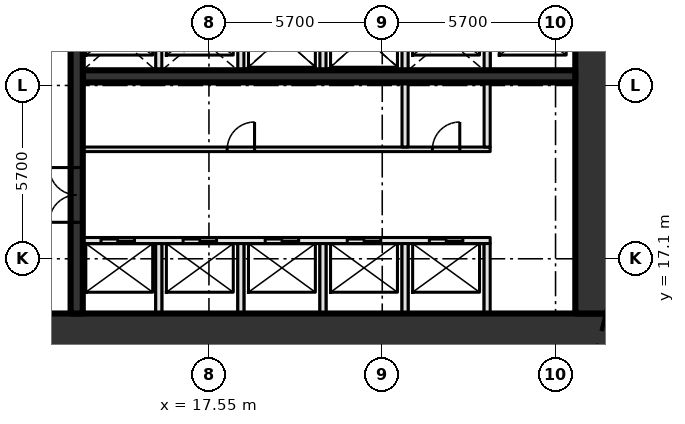
"""IFC4 building model, lengths in metres.
Left out: names, types, materials, properties, quantities, classifications, styles, units other than length and angle.
Written with IfcOpenShell. Run it as: python <this file> out.ifc"""

import sys

from ifc_helpers import new_model, si_unit, direction, frame, frame_2d, origin, place, context, subcontext, project, spatial, rectangle, extrude, element, fill, save


model = new_model("IFC4")
c1 = context("Model", 3, precision=1e-05, world=origin(), true_north=direction((0.0, 1.0)))
c2 = subcontext(c1, "Body", "Model", "MODEL_VIEW")
j1 = project(units=[si_unit("LENGTHUNIT", "METRE"), si_unit("PLANEANGLEUNIT", "RADIAN")], contexts=[c1])
p1 = place(None, origin())
s1 = spatial("IfcSite", under=j1, at=p1, CompositionType="ELEMENT")
p2 = place(p1, origin())
s2 = spatial("IfcBuilding", under=s1, at=p2, CompositionType="ELEMENT")
p3 = place(p2, origin())
s3 = spatial("IfcBuildingStorey", under=s2, at=p3, CompositionType="ELEMENT", Elevation=0.0)
p4 = place(p3, frame((8.0, 14.7, -0.45), z_axis=(0.0, 0.0, 1.0), x_axis=(1.0, 0.0, 0.0)))
e1 = element("IfcWall", 1, at=p4, inside=s3, PredefinedType="SHEAR", context=c2, shape_type="SweptSolid", body=[
    extrude(rectangle(XDim=22.8, YDim=1.2, at=frame_2d((11.4, 0.0))), origin(), (0.0, 0.0, 1.0), 7.2),
])
p5 = place(p4, frame((2.3, 0.0, 0.45)))
e2 = element("IfcOpeningElement", 2, at=p5, cuts=e1, PredefinedType="OPENING", context=c2, shape_type="SweptSolid", body=[
    extrude(rectangle(XDim=1.8, YDim=2.1, at=frame_2d((0.9, 1.05))), frame((0.0, 0.61, 0.0), z_axis=(0.0, -1.0, 0.0), x_axis=(1.0, 0.0, 0.0)), (0.0, 0.0, 1.0), 1.22),
])
p6 = place(p3, frame((30.2, 15.3, -0.45), z_axis=(0.0, 0.0, 1.0), x_axis=(0.0, 1.0, 0.0)))
e3 = element("IfcWall", 3, at=p6, inside=s3, PredefinedType="SHEAR", context=c2, shape_type="SweptSolid", body=[
    extrude(rectangle(XDim=20.4, YDim=1.2, at=frame_2d((10.2, 0.0))), origin(), (0.0, 0.0, 1.0), 7.2),
])
p7 = place(p3, frame((13.4, 17.7, 0.0), z_axis=(0.0, 0.0, 1.0), x_axis=(1.0, 0.0, 0.0)))
e4 = element("IfcWall", 4, at=p7, inside=s3, PredefinedType="SOLIDWALL", context=c2, shape_type="SweptSolid", body=[
    extrude(rectangle(XDim=13.4, YDim=0.2, at=frame_2d((6.7, 0.0))), origin(), (0.0, 0.0, 1.0), 6.75),
])
p8 = place(p7, frame((0.6, 0.0, 0.0)))
e5 = element("IfcOpeningElement", 5, at=p8, cuts=e4, PredefinedType="OPENING", context=c2, shape_type="SweptSolid", body=[
    extrude(rectangle(XDim=1.1, YDim=2.1, at=frame_2d((0.55, 1.05))), frame((0.0, 0.11, 0.0), z_axis=(0.0, -1.0, 0.0), x_axis=(1.0, 0.0, 0.0)), (0.0, 0.0, 1.0), 0.22),
])
p9 = place(p7, frame((3.3, 0.0, 0.0)))
e6 = element("IfcOpeningElement", 6, at=p9, cuts=e4, PredefinedType="OPENING", context=c2, shape_type="SweptSolid", body=[
    extrude(rectangle(XDim=1.1, YDim=2.1, at=frame_2d((0.55, 1.05))), frame((0.0, 0.11, 0.0), z_axis=(0.0, -1.0, 0.0), x_axis=(1.0, 0.0, 0.0)), (0.0, 0.0, 1.0), 0.22),
])
p10 = place(p7, frame((6.0, 0.0, 0.0)))
e7 = element("IfcOpeningElement", 7, at=p10, cuts=e4, PredefinedType="OPENING", context=c2, shape_type="SweptSolid", body=[
    extrude(rectangle(XDim=1.1, YDim=2.1, at=frame_2d((0.55, 1.05))), frame((0.0, 0.11, 0.0), z_axis=(0.0, -1.0, 0.0), x_axis=(1.0, 0.0, 0.0)), (0.0, 0.0, 1.0), 0.22),
])
p11 = place(p7, frame((8.7, 0.0, 0.0)))
e8 = element("IfcOpeningElement", 8, at=p11, cuts=e4, PredefinedType="OPENING", context=c2, shape_type="SweptSolid", body=[
    extrude(rectangle(XDim=1.1, YDim=2.1, at=frame_2d((0.55, 1.05))), frame((0.0, 0.11, 0.0), z_axis=(0.0, -1.0, 0.0), x_axis=(1.0, 0.0, 0.0)), (0.0, 0.0, 1.0), 0.22),
])
p12 = place(p7, frame((11.4, 0.0, 0.0)))
e9 = element("IfcOpeningElement", 9, at=p12, cuts=e4, PredefinedType="OPENING", context=c2, shape_type="SweptSolid", body=[
    extrude(rectangle(XDim=1.1, YDim=2.1, at=frame_2d((0.55, 1.05))), frame((0.0, 0.11, 0.0), z_axis=(0.0, -1.0, 0.0), x_axis=(1.0, 0.0, 0.0)), (0.0, 0.0, 1.0), 0.22),
])
p13 = place(p3, frame((13.4, 20.7, 0.0), z_axis=(0.0, 0.0, 1.0), x_axis=(1.0, 0.0, 0.0)))
e10 = element("IfcWall", 10, at=p13, inside=s3, PredefinedType="PARTITIONING", context=c2, shape_type="SweptSolid", body=[
    extrude(rectangle(XDim=13.4, YDim=0.15, at=frame_2d((6.7, 0.0))), origin(), (0.0, 0.0, 1.0), 6.75),
])
p14 = place(p13, frame((4.75, 0.0, 0.0)))
e11 = element("IfcOpeningElement", 11, at=p14, cuts=e10, PredefinedType="OPENING", context=c2, shape_type="SweptSolid", body=[
    extrude(rectangle(XDim=0.9, YDim=2.1, at=frame_2d((0.45, 1.05))), frame((0.0, 0.085, 0.0), z_axis=(0.0, -1.0, 0.0), x_axis=(1.0, 0.0, 0.0)), (0.0, 0.0, 1.0), 0.17),
])
p15 = place(p13, frame((11.5, 0.0, 0.0)))
e12 = element("IfcOpeningElement", 12, at=p15, cuts=e10, PredefinedType="OPENING", context=c2, shape_type="SweptSolid", body=[
    extrude(rectangle(XDim=0.9, YDim=2.1, at=frame_2d((0.45, 1.05))), frame((0.0, 0.085, 0.0), z_axis=(0.0, -1.0, 0.0), x_axis=(1.0, 0.0, 0.0)), (0.0, 0.0, 1.0), 0.17),
])
p16 = place(p3, frame((13.4, 23.1, 0.0), z_axis=(0.0, 0.0, 1.0), x_axis=(1.0, 0.0, 0.0)))
e13 = element("IfcWall", 13, at=p16, inside=s3, PredefinedType="SHEAR", context=c2, shape_type="SweptSolid", body=[
    extrude(rectangle(XDim=16.2, YDim=0.4, at=frame_2d((8.1, 0.0))), origin(), (0.0, 0.0, 1.0), 6.75),
])
p17 = place(p3, frame((13.2, 15.3, 0.0), z_axis=(0.0, 0.0, 1.0), x_axis=(0.0, 1.0, 0.0)))
e14 = element("IfcWall", 14, at=p17, inside=s3, PredefinedType="SHEAR", context=c2, shape_type="SweptSolid", body=[
    extrude(rectangle(XDim=20.4, YDim=0.4, at=frame_2d((10.2, 0.0))), origin(), (0.0, 0.0, 1.0), 6.75),
])
p18 = place(p17, frame((3.0, 0.0, 0.0)))
e15 = element("IfcOpeningElement", 15, at=p18, cuts=e14, PredefinedType="OPENING", context=c2, shape_type="SweptSolid", body=[
    extrude(rectangle(XDim=1.8, YDim=2.1, at=frame_2d((0.9, 1.05))), frame((0.0, 0.21, 0.0), z_axis=(0.0, -1.0, 0.0), x_axis=(1.0, 0.0, 0.0)), (0.0, 0.0, 1.0), 0.42),
])
p19 = place(p17, frame((11.1, 0.0, 0.0)))
e16 = element("IfcOpeningElement", 16, at=p19, cuts=e14, PredefinedType="OPENING", context=c2, shape_type="SweptSolid", body=[
    extrude(rectangle(XDim=1.2, YDim=2.1, at=frame_2d((0.6, 1.05))), frame((0.0, 0.21, 0.0), z_axis=(0.0, -1.0, 0.0), x_axis=(1.0, 0.0, 0.0)), (0.0, 0.0, 1.0), 0.42),
])
p20 = place(p3, frame((15.9, 15.3, 0.0), z_axis=(0.0, 0.0, 1.0), x_axis=(0.0, 1.0, 0.0)))
e17 = element("IfcWall", 17, at=p20, inside=s3, PredefinedType="SOLIDWALL", context=c2, shape_type="SweptSolid", body=[
    extrude(rectangle(XDim=2.3, YDim=0.2, at=frame_2d((1.15, 0.0))), origin(), (0.0, 0.0, 1.0), 6.75),
])
p21 = place(p3, frame((15.9, 23.3, 0.0), z_axis=(0.0, 0.0, 1.0), x_axis=(0.0, 1.0, 0.0)))
e18 = element("IfcWall", 18, at=p21, inside=s3, PredefinedType="SOLIDWALL", context=c2, shape_type="SweptSolid", body=[
    extrude(rectangle(XDim=2.1, YDim=0.2, at=frame_2d((1.05, 0.0))), origin(), (0.0, 0.0, 1.0), 6.75),
])
p22 = place(p3, frame((18.6, 15.3, 0.0), z_axis=(0.0, 0.0, 1.0), x_axis=(0.0, 1.0, 0.0)))
e19 = element("IfcWall", 19, at=p22, inside=s3, PredefinedType="SOLIDWALL", context=c2, shape_type="SweptSolid", body=[
    extrude(rectangle(XDim=2.3, YDim=0.2, at=frame_2d((1.15, 0.0))), origin(), (0.0, 0.0, 1.0), 6.75),
])
p23 = place(p3, frame((18.6, 23.3, 0.0), z_axis=(0.0, 0.0, 1.0), x_axis=(0.0, 1.0, 0.0)))
e20 = element("IfcWall", 20, at=p23, inside=s3, PredefinedType="SOLIDWALL", context=c2, shape_type="SweptSolid", body=[
    extrude(rectangle(XDim=5.1, YDim=0.2, at=frame_2d((2.55, 0.0))), origin(), (0.0, 0.0, 1.0), 6.75),
])
p24 = place(p23, frame((3.1, 0.0, 0.0)))
e21 = element("IfcOpeningElement", 21, at=p24, cuts=e20, PredefinedType="OPENING", context=c2, shape_type="SweptSolid", body=[
    extrude(rectangle(XDim=1.2, YDim=2.1, at=frame_2d((0.6, 1.05))), frame((0.0, 0.11, 0.0), z_axis=(0.0, -1.0, 0.0), x_axis=(1.0, 0.0, 0.0)), (0.0, 0.0, 1.0), 0.22),
])
p25 = place(p3, frame((21.3, 15.3, 0.0), z_axis=(0.0, 0.0, 1.0), x_axis=(0.0, 1.0, 0.0)))
e22 = element("IfcWall", 22, at=p25, inside=s3, PredefinedType="SOLIDWALL", context=c2, shape_type="SweptSolid", body=[
    extrude(rectangle(XDim=2.3, YDim=0.2, at=frame_2d((1.15, 0.0))), origin(), (0.0, 0.0, 1.0), 6.75),
])
p26 = place(p3, frame((21.3, 23.3, 0.0), z_axis=(0.0, 0.0, 1.0), x_axis=(0.0, 1.0, 0.0)))
e23 = element("IfcWall", 23, at=p26, inside=s3, PredefinedType="SOLIDWALL", context=c2, shape_type="SweptSolid", body=[
    extrude(rectangle(XDim=2.1, YDim=0.2, at=frame_2d((1.05, 0.0))), origin(), (0.0, 0.0, 1.0), 6.75),
])
p27 = place(p3, frame((24.0, 15.3, 0.0), z_axis=(0.0, 0.0, 1.0), x_axis=(0.0, 1.0, 0.0)))
e24 = element("IfcWall", 24, at=p27, inside=s3, PredefinedType="SOLIDWALL", context=c2, shape_type="SweptSolid", body=[
    extrude(rectangle(XDim=2.3, YDim=0.2, at=frame_2d((1.15, 0.0))), origin(), (0.0, 0.0, 1.0), 6.75),
])
p28 = place(p3, frame((24.0, 20.775, 0.0), z_axis=(0.0, 0.0, 1.0), x_axis=(0.0, 1.0, 0.0)))
e25 = element("IfcWall", 25, at=p28, inside=s3, PredefinedType="SOLIDWALL", context=c2, shape_type="SweptSolid", body=[
    extrude(rectangle(XDim=4.625, YDim=0.2, at=frame_2d((2.312, 0.0))), origin(), (0.0, 0.0, 1.0), 6.75),
])
p29 = place(p3, frame((26.7, 15.3, 0.0), z_axis=(0.0, 0.0, 1.0), x_axis=(0.0, 1.0, 0.0)))
e26 = element("IfcWall", 26, at=p29, inside=s3, PredefinedType="SOLIDWALL", context=c2, shape_type="SweptSolid", body=[
    extrude(rectangle(XDim=2.3, YDim=0.2, at=frame_2d((1.15, 0.0))), origin(), (0.0, 0.0, 1.0), 6.75),
])
p30 = place(p3, frame((26.7, 20.775, 0.0), z_axis=(0.0, 0.0, 1.0), x_axis=(0.0, 1.0, 0.0)))
e27 = element("IfcWall", 27, at=p30, inside=s3, PredefinedType="SOLIDWALL", context=c2, shape_type="SweptSolid", body=[
    extrude(rectangle(XDim=4.625, YDim=0.2, at=frame_2d((2.312, 0.0))), origin(), (0.0, 0.0, 1.0), 6.75),
])
p31 = place(p8, origin())
e28 = element("IfcDoor", 28, at=p31, inside=s3, OperationType="SLIDING_TO_LEFT", PredefinedType="DOOR", context=c2, shape_type="SweptSolid", body=[
    extrude(rectangle(XDim=1.1, YDim=2.1, at=frame_2d((0.55, 1.05))), frame((0.0, 0.025, 0.0), z_axis=(0.0, -1.0, 0.0), x_axis=(1.0, 0.0, 0.0)), (0.0, 0.0, 1.0), 0.05),
])
fill(e5, e28)
p32 = place(p9, origin())
e29 = element("IfcDoor", 29, at=p32, inside=s3, OperationType="SLIDING_TO_LEFT", PredefinedType="DOOR", context=c2, shape_type="SweptSolid", body=[
    extrude(rectangle(XDim=1.1, YDim=2.1, at=frame_2d((0.55, 1.05))), frame((0.0, 0.025, 0.0), z_axis=(0.0, -1.0, 0.0), x_axis=(1.0, 0.0, 0.0)), (0.0, 0.0, 1.0), 0.05),
])
fill(e6, e29)
p33 = place(p10, origin())
e30 = element("IfcDoor", 30, at=p33, inside=s3, OperationType="SLIDING_TO_LEFT", PredefinedType="DOOR", context=c2, shape_type="SweptSolid", body=[
    extrude(rectangle(XDim=1.1, YDim=2.1, at=frame_2d((0.55, 1.05))), frame((0.0, 0.025, 0.0), z_axis=(0.0, -1.0, 0.0), x_axis=(1.0, 0.0, 0.0)), (0.0, 0.0, 1.0), 0.05),
])
fill(e7, e30)
p34 = place(p11, origin())
e31 = element("IfcDoor", 31, at=p34, inside=s3, OperationType="SLIDING_TO_LEFT", PredefinedType="DOOR", context=c2, shape_type="SweptSolid", body=[
    extrude(rectangle(XDim=1.1, YDim=2.1, at=frame_2d((0.55, 1.05))), frame((0.0, 0.025, 0.0), z_axis=(0.0, -1.0, 0.0), x_axis=(1.0, 0.0, 0.0)), (0.0, 0.0, 1.0), 0.05),
])
fill(e8, e31)
p35 = place(p12, origin())
e32 = element("IfcDoor", 32, at=p35, inside=s3, OperationType="SLIDING_TO_LEFT", PredefinedType="DOOR", context=c2, shape_type="SweptSolid", body=[
    extrude(rectangle(XDim=1.1, YDim=2.1, at=frame_2d((0.55, 1.05))), frame((0.0, 0.025, 0.0), z_axis=(0.0, -1.0, 0.0), x_axis=(1.0, 0.0, 0.0)), (0.0, 0.0, 1.0), 0.05),
])
fill(e9, e32)
p36 = place(p14, origin())
e33 = element("IfcDoor", 33, at=p36, inside=s3, OperationType="SINGLE_SWING_RIGHT", PredefinedType="DOOR", context=c2, shape_type="SweptSolid", body=[
    extrude(rectangle(XDim=0.9, YDim=2.1, at=frame_2d((0.45, 1.05))), frame((0.0, 0.025, 0.0), z_axis=(0.0, -1.0, 0.0), x_axis=(1.0, 0.0, 0.0)), (0.0, 0.0, 1.0), 0.05),
])
fill(e11, e33)
p37 = place(p15, origin())
e34 = element("IfcDoor", 34, at=p37, inside=s3, OperationType="SINGLE_SWING_RIGHT", PredefinedType="DOOR", context=c2, shape_type="SweptSolid", body=[
    extrude(rectangle(XDim=0.9, YDim=2.1, at=frame_2d((0.45, 1.05))), frame((0.0, 0.025, 0.0), z_axis=(0.0, -1.0, 0.0), x_axis=(1.0, 0.0, 0.0)), (0.0, 0.0, 1.0), 0.05),
])
fill(e12, e34)
p38 = place(p18, origin())
e35 = element("IfcDoor", 35, at=p38, inside=s3, OperationType="DOUBLE_DOOR_SINGLE_SWING", PredefinedType="DOOR", context=c2, shape_type="SweptSolid", body=[
    extrude(rectangle(XDim=1.8, YDim=2.1, at=frame_2d((0.9, 1.05))), frame((0.0, 0.025, 0.0), z_axis=(0.0, -1.0, 0.0), x_axis=(1.0, 0.0, 0.0)), (0.0, 0.0, 1.0), 0.05),
])
fill(e15, e35)
save(model, sys.argv[1])
